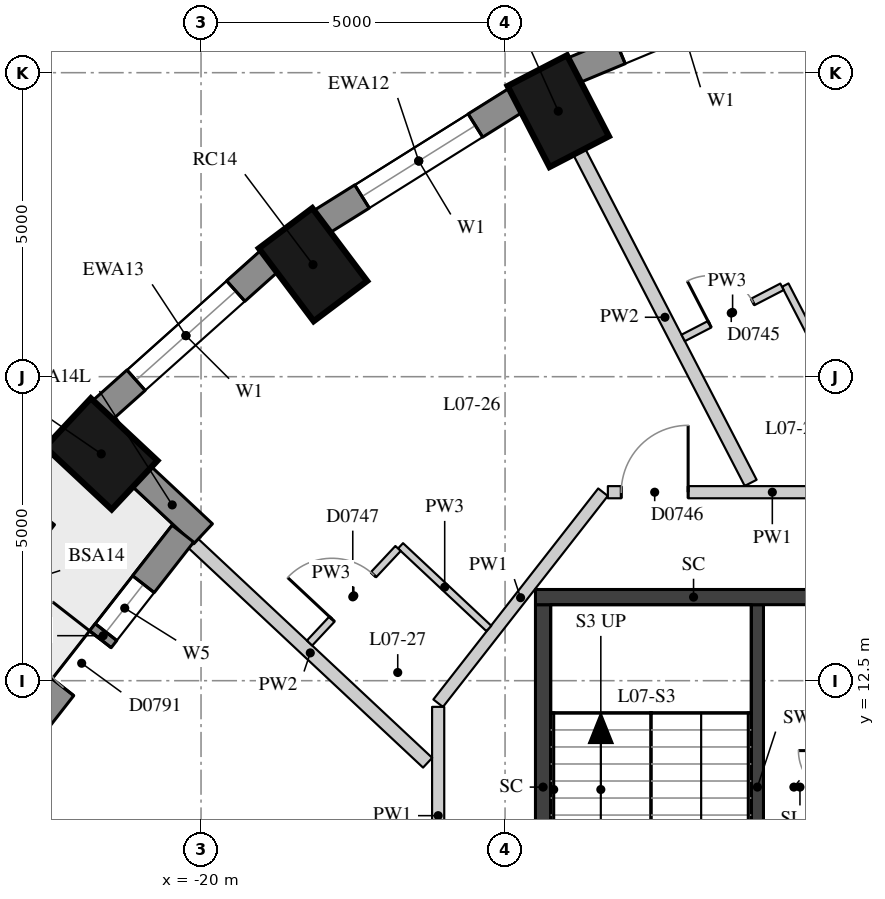
"""IFC4 building model, lengths in metres.
Left out: names, types, materials, properties, quantities, classifications, styles, units other than length and angle.
Written with IfcOpenShell. Run it as: python <this file> out.ifc"""

import sys

from ifc_helpers import new_model, si_unit, direction, frame, frame_2d, origin, origin_2d, place, context, subcontext, project, spatial, rectangle, extrude, element, fill, save


model = new_model("IFC4")
c1 = context("Model", 3, precision=1e-05, world=origin(), true_north=direction((0.0, 1.0)))
c2 = subcontext(c1, "Body", "Model", "MODEL_VIEW")
j1 = project(units=[si_unit("LENGTHUNIT", "METRE"), si_unit("PLANEANGLEUNIT", "RADIAN")], contexts=[c1])
p1 = place(None, origin())
s1 = spatial("IfcSite", under=j1, at=p1, CompositionType="ELEMENT")
p2 = place(p1, origin())
s2 = spatial("IfcBuilding", under=s1, at=p2, CompositionType="ELEMENT")
p3 = place(p2, frame((0.0, 0.0, 31.6)))
s3 = spatial("IfcBuildingStorey", under=s2, at=p3, CompositionType="ELEMENT", Elevation=31.6)
for number, where, z_axis, x_axis in (
    (1, (-14.125, 21.867, 0.0), (0.0, 0.0, 1.0), (-0.46, 0.888, 0.0)),
    (2, (-18.159, 19.343, 0.0), (0.0, 0.0, 1.0), (-0.601, 0.799, 0.0)),
    (3, (-21.641, 16.23, 0.0), (0.0, 0.0, 1.0), (-0.73, 0.683, 0.0)),
):
    element("IfcColumn", number, at=place(p3, frame(where, z_axis=z_axis, x_axis=x_axis)), inside=s3, PredefinedType="COLUMN", context=c2, shape_type="SweptSolid", body=[
        extrude(rectangle(XDim=1.5, YDim=1.1, at=origin_2d()), origin(), (0.0, 0.0, 1.0), 3.3),
    ])
p4 = place(p3, frame((-10.315, 24.021, 0.0), z_axis=(0.0, 0.0, 1.0), x_axis=(-0.923031964282, -0.384723267966, 0.0)))
e4 = element("IfcWall", 4, at=p4, inside=s3, PredefinedType="SOLIDWALL", context=c2, shape_type="SweptSolid", body=[
    extrude(rectangle(XDim=3.856, YDim=0.45, at=frame_2d((1.928, 0.0))), origin(), (0.0, 0.0, 1.0), 3.02),
])
p5 = place(p4, frame((0.828, 0.0, 0.4)))
e5 = element("IfcOpeningElement", 5, at=p5, cuts=e4, PredefinedType="OPENING", context=c2, shape_type="SweptSolid", body=[
    extrude(rectangle(XDim=2.2, YDim=1.75, at=frame_2d((1.1, 0.875))), frame((0.0, 0.235, 0.0), z_axis=(0.0, -1.0, 0.0), x_axis=(1.0, 0.0, 0.0)), (0.0, 0.0, 1.0), 0.47),
])
p6 = place(p3, frame((-14.817, 22.051, 0.0), z_axis=(0.0, 0.0, 1.0), x_axis=(-0.847635480093, -0.530579016629, 0.0)))
e6 = element("IfcWall", 6, at=p6, inside=s3, PredefinedType="SOLIDWALL", context=c2, shape_type="SweptSolid", body=[
    extrude(rectangle(XDim=3.782, YDim=0.45, at=frame_2d((1.891, 0.0))), origin(), (0.0, 0.0, 1.0), 3.02),
])
p7 = place(p6, frame((0.791, 0.0, 0.4)))
e7 = element("IfcOpeningElement", 7, at=p7, cuts=e6, PredefinedType="OPENING", context=c2, shape_type="SweptSolid", body=[
    extrude(rectangle(XDim=2.2, YDim=1.75, at=frame_2d((1.1, 0.875))), frame((0.0, 0.235, 0.0), z_axis=(0.0, -1.0, 0.0), x_axis=(1.0, 0.0, 0.0)), (0.0, 0.0, 1.0), 0.47),
])
p8 = place(p3, frame((-18.871, 19.407, 0.0), z_axis=(0.0, 0.0, 1.0), x_axis=(-0.745526233716, -0.66647628228, 0.0)))
e8 = element("IfcWall", 8, at=p8, inside=s3, PredefinedType="SOLIDWALL", context=c2, shape_type="SweptSolid", body=[
    extrude(rectangle(XDim=3.697, YDim=0.45, at=frame_2d((1.848, 0.0))), origin(), (0.0, 0.0, 1.0), 3.02),
])
p9 = place(p8, frame((0.749, 0.0, 0.4)))
e9 = element("IfcOpeningElement", 9, at=p9, cuts=e8, PredefinedType="OPENING", context=c2, shape_type="SweptSolid", body=[
    extrude(rectangle(XDim=2.2, YDim=1.75, at=frame_2d((1.1, 0.875))), frame((0.0, 0.235, 0.0), z_axis=(0.0, -1.0, 0.0), x_axis=(1.0, 0.0, 0.0)), (0.0, 0.0, 1.0), 0.47),
])
p10 = place(p3, frame((-20.982, 15.866, 0.0), z_axis=(0.0, 0.0, 1.0), x_axis=(0.730062381614, -0.683380508174, 0.0)))
e10 = element("IfcWall", 10, at=p10, inside=s3, PredefinedType="SOLIDWALL", context=c2, shape_type="SweptSolid", body=[
    extrude(rectangle(XDim=1.391, YDim=0.45, at=frame_2d((0.696, 0.0))), origin(), (0.0, 0.0, 1.0), 3.02),
])
p11 = place(p3, frame((-20.298, 14.918, 0.0), z_axis=(0.0, 0.0, 1.0), x_axis=(-0.615578403957, -0.788075649022, 0.0)))
e11 = element("IfcWall", 11, at=p11, inside=s3, PredefinedType="SOLIDWALL", context=c2, shape_type="SweptSolid", body=[
    extrude(rectangle(XDim=4.259, YDim=0.45, at=frame_2d((2.129, 0.0))), origin(), (0.0, 0.0, 1.0), 3.02),
])
p12 = place(p11, frame((1.054, 0.0, 0.4)))
e12 = element("IfcOpeningElement", 12, at=p12, cuts=e11, PredefinedType="OPENING", context=c2, shape_type="SweptSolid", body=[
    extrude(rectangle(XDim=1.0, YDim=1.75, at=frame_2d((0.5, 0.875))), frame((0.0, 0.235, 0.0), z_axis=(0.0, -1.0, 0.0), x_axis=(1.0, 0.0, 0.0)), (0.0, 0.0, 1.0), 0.47),
])
p13 = place(p11, frame((2.204, 0.0, 0.0)))
e13 = element("IfcOpeningElement", 13, at=p13, cuts=e11, PredefinedType="OPENING", context=c2, shape_type="SweptSolid", body=[
    extrude(rectangle(XDim=1.0, YDim=2.15, at=frame_2d((0.5, 1.075))), frame((0.0, 0.235, 0.0), z_axis=(0.0, -1.0, 0.0), x_axis=(1.0, 0.0, 0.0)), (0.0, 0.0, 1.0), 0.47),
])
p14 = place(p3, frame((-22.686, 15.281, 0.0), z_axis=(0.0, 0.0, 1.0), x_axis=(-0.616622746332, -0.787258781282, 0.0)))
e14 = element("IfcWall", 14, at=p14, inside=s3, PredefinedType="USERDEFINED", context=c2, shape_type="SweptSolid", body=[
    extrude(rectangle(XDim=1.8, YDim=0.7, at=frame_2d((0.9, 0.0))), origin(), (0.0, 0.0, 1.0), 0.75),
])
p15 = place(p3, frame((-10.85, 7.75, 0.0), z_axis=(0.0, 0.0, 1.0), x_axis=(0.0, 1.0, 0.0)))
e15 = element("IfcWall", 15, at=p15, inside=s3, PredefinedType="SHEAR", context=c2, shape_type="SweptSolid", body=[
    extrude(rectangle(XDim=6.0, YDim=0.2, at=frame_2d((3.0, 0.0))), origin(), (0.0, 0.0, 1.0), 3.02),
])
p16 = place(p15, frame((0.1, 0.0, 0.0)))
e16 = element("IfcOpeningElement", 16, at=p16, cuts=e15, PredefinedType="OPENING", context=c2, shape_type="SweptSolid", body=[
    extrude(rectangle(XDim=1.5, YDim=2.1, at=frame_2d((0.75, 1.05))), frame((0.0, 0.11, 0.0), z_axis=(0.0, -1.0, 0.0), x_axis=(1.0, 0.0, 0.0)), (0.0, 0.0, 1.0), 0.22),
])
p17 = place(p3, frame((-14.375, 7.75, -0.28), z_axis=(0.0, 0.0, 1.0), x_axis=(0.0, 1.0, 0.0)))
e17 = element("IfcWall", 17, at=p17, inside=s3, PredefinedType="SHEAR", context=c2, shape_type="SweptSolid", body=[
    extrude(rectangle(XDim=6.0, YDim=0.25, at=frame_2d((3.0, 0.0))), origin(), (0.0, 0.0, 1.0), 3.3),
])
p18 = place(p3, frame((-14.5, 13.875, -0.28), z_axis=(0.0, 0.0, 1.0), x_axis=(1.0, 0.0, 0.0)))
e18 = element("IfcWall", 18, at=p18, inside=s3, PredefinedType="SHEAR", context=c2, shape_type="SweptSolid", body=[
    extrude(rectangle(XDim=5.2, YDim=0.25, at=frame_2d((2.6, 0.0))), origin(), (0.0, 0.0, 1.0), 3.3),
])
p19 = place(p3, frame((-16.1, 12.13, 0.0), z_axis=(0.0, 0.0, 1.0), x_axis=(0.615593476668, 0.788063875256, 0.0)))
e19 = element("IfcWall", 19, at=p19, inside=s3, PredefinedType="PARTITIONING", context=c2, shape_type="SweptSolid", body=[
    extrude(rectangle(XDim=4.404, YDim=0.2, at=frame_2d((2.202, 0.0))), origin(), (0.0, 0.0, 1.0), 3.02),
])
p20 = place(p3, frame((-13.309, 15.6, 0.0), z_axis=(0.0, 0.0, 1.0), x_axis=(1.0, 0.0, 0.0)))
e20 = element("IfcWall", 20, at=p20, inside=s3, PredefinedType="PARTITIONING", context=c2, shape_type="SweptSolid", body=[
    extrude(rectangle(XDim=5.409, YDim=0.2, at=frame_2d((2.705, 0.0))), origin(), (0.0, 0.0, 1.0), 3.02),
])
p21 = place(p20, frame((0.22, 0.0, 0.0)))
e21 = element("IfcOpeningElement", 21, at=p21, cuts=e20, PredefinedType="OPENING", context=c2, shape_type="SweptSolid", body=[
    extrude(rectangle(XDim=1.1, YDim=2.1, at=frame_2d((0.55, 1.05))), frame((0.0, 0.11, 0.0), z_axis=(0.0, -1.0, 0.0), x_axis=(1.0, 0.0, 0.0)), (0.0, 0.0, 1.0), 0.22),
])
p22 = place(p3, frame((-16.1, 8.491, 0.0), z_axis=(0.0, 0.0, 1.0), x_axis=(0.0, 1.0, 0.0)))
e22 = element("IfcWall", 22, at=p22, inside=s3, PredefinedType="PARTITIONING", context=c2, shape_type="SweptSolid", body=[
    extrude(rectangle(XDim=3.579, YDim=0.2, at=frame_2d((1.79, 0.0))), origin(), (0.0, 0.0, 1.0), 3.02),
])
p23 = place(p22, frame((0.22, 0.0, 0.0)))
e23 = element("IfcOpeningElement", 23, at=p23, cuts=e22, PredefinedType="OPENING", context=c2, shape_type="SweptSolid", body=[
    extrude(rectangle(XDim=1.1, YDim=2.1, at=frame_2d((0.55, 1.05))), frame((0.0, 0.11, 0.0), z_axis=(0.0, -1.0, 0.0), x_axis=(1.0, 0.0, 0.0)), (0.0, 0.0, 1.0), 0.22),
])
p24 = place(p3, frame((-13.78, 21.201, 0.0), z_axis=(0.0, 0.0, 1.0), x_axis=(0.459699000582, -0.888074787878, 0.0)))
e24 = element("IfcWall", 24, at=p24, inside=s3, PredefinedType="PARTITIONING", context=c2, shape_type="SweptSolid", body=[
    extrude(rectangle(XDim=6.134, YDim=0.22, at=frame_2d((3.067, 0.0))), origin(), (0.0, 0.0, 1.0), 3.02),
])
p25 = place(p3, frame((-20.133, 14.764, 0.0), z_axis=(0.0, 0.0, 1.0), x_axis=(0.730065516357, -0.68337715928, 0.0)))
e25 = element("IfcWall", 25, at=p25, inside=s3, PredefinedType="PARTITIONING", context=c2, shape_type="SweptSolid", body=[
    extrude(rectangle(XDim=5.287, YDim=0.22, at=frame_2d((2.643, 0.0))), origin(), (0.0, 0.0, 1.0), 3.02),
])
p26 = place(p3, frame((-8.69, 15.718, 0.0), z_axis=(0.0, 0.0, 1.0), x_axis=(-0.45967225044, 0.888088634189, 0.0)))
e26 = element("IfcWall", 26, at=p26, inside=s3, PredefinedType="PARTITIONING", context=c2, shape_type="SweptSolid", body=[
    extrude(rectangle(XDim=3.702, YDim=0.12, at=frame_2d((1.851, 0.0))), origin(), (0.0, 0.0, 1.0), 3.02),
])
p27 = place(p3, frame((-15.267, 13.359, 0.0), z_axis=(0.0, 0.0, 1.0), x_axis=(-0.730103481834, 0.683336597742, 0.0)))
e27 = element("IfcWall", 27, at=p27, inside=s3, PredefinedType="PARTITIONING", context=c2, shape_type="SweptSolid", body=[
    extrude(rectangle(XDim=1.989, YDim=0.12, at=frame_2d((0.995, 0.0))), origin(), (0.0, 0.0, 1.0), 3.02),
])
p28 = place(p3, frame((-10.445, 18.978, 0.0), z_axis=(0.0, 0.0, 1.0), x_axis=(-0.888095574179, -0.459658842104, 0.0)))
e28 = element("IfcWall", 28, at=p28, inside=s3, PredefinedType="PARTITIONING", context=c2, shape_type="SweptSolid", body=[
    extrude(rectangle(XDim=1.83, YDim=0.12, at=frame_2d((0.915, 0.0))), origin(), (0.0, 0.0, 1.0), 3.02),
])
p29 = place(p28, frame((0.54, 0.0, 0.0)))
e29 = element("IfcOpeningElement", 29, at=p29, cuts=e28, PredefinedType="OPENING", context=c2, shape_type="SweptSolid", body=[
    extrude(rectangle(XDim=0.8, YDim=2.1, at=frame_2d((0.4, 1.05))), frame((0.0, 0.07, 0.0), z_axis=(0.0, -1.0, 0.0), x_axis=(1.0, 0.0, 0.0)), (0.0, 0.0, 1.0), 0.14),
])
p30 = place(p3, frame((-16.76, 14.674, 0.0), z_axis=(0.0, 0.0, 1.0), x_axis=(-0.683334594436, -0.730105356813, 0.0)))
e30 = element("IfcWall", 30, at=p30, inside=s3, PredefinedType="PARTITIONING", context=c2, shape_type="SweptSolid", body=[
    extrude(rectangle(XDim=2.13, YDim=0.12, at=frame_2d((1.065, 0.0))), origin(), (0.0, 0.0, 1.0), 3.02),
])
p31 = place(p30, frame((0.59, 0.0, 0.0)))
e31 = element("IfcOpeningElement", 31, at=p31, cuts=e30, PredefinedType="OPENING", context=c2, shape_type="SweptSolid", body=[
    extrude(rectangle(XDim=1.0, YDim=2.1, at=frame_2d((0.5, 1.05))), frame((0.0, 0.07, 0.0), z_axis=(0.0, -1.0, 0.0), x_axis=(1.0, 0.0, 0.0)), (0.0, 0.0, 1.0), 0.14),
])
p32 = place(p5, origin())
e32 = element("IfcWindow", 32, at=p32, inside=s3, PartitioningType="SINGLE_PANEL", PredefinedType="WINDOW", context=c2, shape_type="SweptSolid", body=[
    extrude(rectangle(XDim=2.2, YDim=1.75, at=frame_2d((1.1, 0.875))), frame((0.0, 0.035, 0.0), z_axis=(0.0, -1.0, 0.0), x_axis=(1.0, 0.0, 0.0)), (0.0, 0.0, 1.0), 0.06),
])
fill(e5, e32)
p33 = place(p7, origin())
e33 = element("IfcWindow", 33, at=p33, inside=s3, PartitioningType="SINGLE_PANEL", PredefinedType="WINDOW", context=c2, shape_type="SweptSolid", body=[
    extrude(rectangle(XDim=2.2, YDim=1.75, at=frame_2d((1.1, 0.875))), frame((0.0, 0.035, 0.0), z_axis=(0.0, -1.0, 0.0), x_axis=(1.0, 0.0, 0.0)), (0.0, 0.0, 1.0), 0.06),
])
fill(e7, e33)
p34 = place(p9, origin())
e34 = element("IfcWindow", 34, at=p34, inside=s3, PartitioningType="SINGLE_PANEL", PredefinedType="WINDOW", context=c2, shape_type="SweptSolid", body=[
    extrude(rectangle(XDim=2.2, YDim=1.75, at=frame_2d((1.1, 0.875))), frame((0.0, 0.035, 0.0), z_axis=(0.0, -1.0, 0.0), x_axis=(1.0, 0.0, 0.0)), (0.0, 0.0, 1.0), 0.06),
])
fill(e9, e34)
p35 = place(p12, origin())
e35 = element("IfcWindow", 35, at=p35, inside=s3, PartitioningType="SINGLE_PANEL", PredefinedType="WINDOW", context=c2, shape_type="SweptSolid", body=[
    extrude(rectangle(XDim=1.0, YDim=1.75, at=frame_2d((0.5, 0.875))), frame((0.0, 0.035, 0.0), z_axis=(0.0, -1.0, 0.0), x_axis=(1.0, 0.0, 0.0)), (0.0, 0.0, 1.0), 0.06),
])
fill(e12, e35)
p36 = place(p13, frame((1.0, 0.0, 0.0), z_axis=(0.0, 0.0, 1.0), x_axis=(-1.0, 0.0, 0.0)))
e36 = element("IfcDoor", 36, at=p36, inside=s3, OperationType="SINGLE_SWING_RIGHT", PredefinedType="DOOR", context=c2, shape_type="SweptSolid", body=[
    extrude(rectangle(XDim=1.0, YDim=2.15, at=frame_2d((0.5, 1.075))), frame((0.0, 0.075, 0.0), z_axis=(0.0, -1.0, 0.0), x_axis=(1.0, 0.0, 0.0)), (0.0, 0.0, 1.0), 0.05),
])
fill(e13, e36)
p37 = place(p29, origin())
e37 = element("IfcDoor", 37, at=p37, inside=s3, OperationType="SINGLE_SWING_LEFT", PredefinedType="DOOR", context=c2, shape_type="SweptSolid", body=[
    extrude(rectangle(XDim=0.8, YDim=2.1, at=frame_2d((0.4, 1.05))), frame((0.0, 0.025, 0.0), z_axis=(0.0, -1.0, 0.0), x_axis=(1.0, 0.0, 0.0)), (0.0, 0.0, 1.0), 0.05),
])
fill(e29, e37)
p38 = place(p21, origin())
e38 = element("IfcDoor", 38, at=p38, inside=s3, OperationType="SINGLE_SWING_RIGHT", PredefinedType="DOOR", context=c2, shape_type="SweptSolid", body=[
    extrude(rectangle(XDim=1.1, YDim=2.1, at=frame_2d((0.55, 1.05))), frame((0.0, 0.025, 0.0), z_axis=(0.0, -1.0, 0.0), x_axis=(1.0, 0.0, 0.0)), (0.0, 0.0, 1.0), 0.05),
])
fill(e21, e38)
p39 = place(p31, origin())
e39 = element("IfcDoor", 39, at=p39, inside=s3, OperationType="SINGLE_SWING_LEFT", PredefinedType="DOOR", context=c2, shape_type="SweptSolid", body=[
    extrude(rectangle(XDim=1.0, YDim=2.1, at=frame_2d((0.5, 1.05))), frame((0.0, 0.025, 0.0), z_axis=(0.0, -1.0, 0.0), x_axis=(1.0, 0.0, 0.0)), (0.0, 0.0, 1.0), 0.05),
])
fill(e31, e39)
save(model, sys.argv[1])
